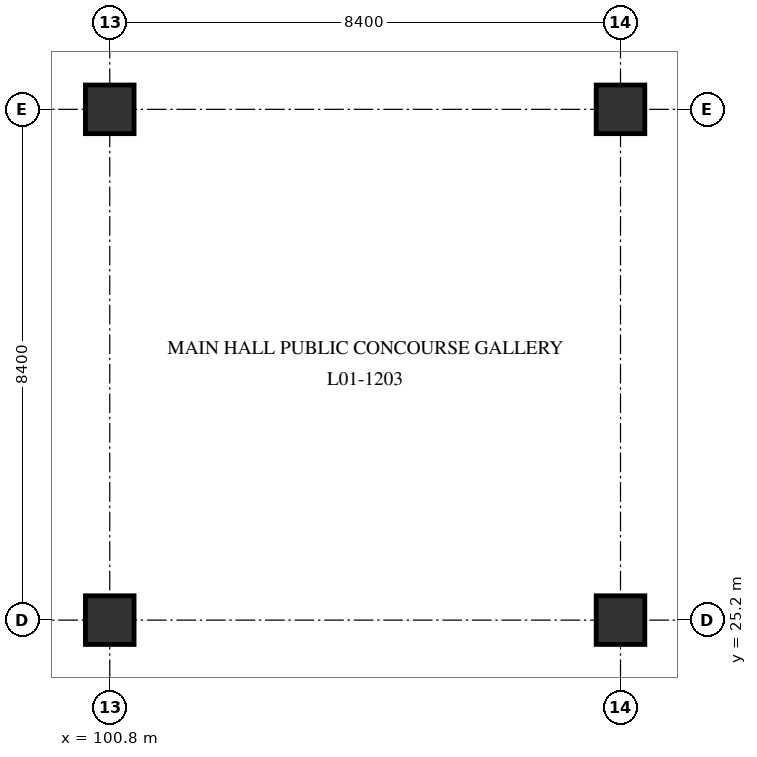
"""IFC4 building model, lengths in metres.
Left out: names, types, materials, properties, quantities, classifications, styles, units other than length and angle.
Written with IfcOpenShell. Run it as: python <this file> out.ifc"""

import sys

from ifc_helpers import new_model, si_unit, direction, frame, origin, origin_2d, place, context, subcontext, project, spatial, rectangle, extrude, element, save


model = new_model("IFC4")
c1 = context("Model", 3, precision=1e-05, world=origin(), true_north=direction((0.0, 1.0)))
c2 = subcontext(c1, "Body", "Model", "MODEL_VIEW")
j1 = project(units=[si_unit("LENGTHUNIT", "METRE"), si_unit("PLANEANGLEUNIT", "RADIAN")], contexts=[c1])
p1 = place(None, origin())
s1 = spatial("IfcSite", under=j1, at=p1, CompositionType="ELEMENT")
p2 = place(p1, origin())
s2 = spatial("IfcBuilding", under=s1, at=p2, CompositionType="ELEMENT")
p3 = place(p2, frame((0.0, 0.0, 4.8)))
s3 = spatial("IfcBuildingStorey", under=s2, at=p3, CompositionType="ELEMENT", Elevation=4.8)
for number, where, z_axis, x_axis in (
    (1, (100.8, 25.2, 0.0), (0.0, 0.0, 1.0), (1.0, 0.0, 0.0)),
    (2, (100.8, 33.6, 0.0), (0.0, 0.0, 1.0), (1.0, 0.0, 0.0)),
    (3, (109.2, 25.2, 0.0), (0.0, 0.0, 1.0), (1.0, 0.0, 0.0)),
    (4, (109.2, 33.6, 0.0), (0.0, 0.0, 1.0), (1.0, 0.0, 0.0)),
):
    element("IfcColumn", number, at=place(p3, frame(where, z_axis=z_axis, x_axis=x_axis)), inside=s3, PredefinedType="COLUMN", context=c2, shape_type="SweptSolid", body=[
        extrude(rectangle(XDim=0.8, YDim=0.8, at=origin_2d()), origin(), (0.0, 0.0, 1.0), 4.5),
    ])
save(model, sys.argv[1])
